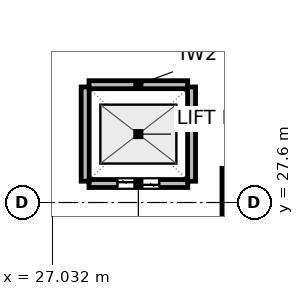
"""IFC4 building model, lengths in metres.
Left out: names, types, materials, properties, quantities, classifications, styles, units other than length and angle.
Written with IfcOpenShell. Run it as: python <this file> out.ifc"""

import sys

from ifc_helpers import new_model, si_unit, direction, frame, frame_2d, origin, origin_2d, place, context, subcontext, project, spatial, rectangle, extrude, element, fill, save


model = new_model("IFC4")
c1 = context("Model", 3, precision=1e-05, world=origin(), true_north=direction((0.0, 1.0)))
c2 = subcontext(c1, "Body", "Model", "MODEL_VIEW")
j1 = project(units=[si_unit("LENGTHUNIT", "METRE"), si_unit("PLANEANGLEUNIT", "RADIAN")], contexts=[c1])
p1 = place(None, origin())
s1 = spatial("IfcSite", under=j1, at=p1, CompositionType="ELEMENT")
p2 = place(p1, origin())
s2 = spatial("IfcBuilding", under=s1, at=p2, CompositionType="ELEMENT")
p3 = place(p2, frame((0.0, 0.0, -4.5)))
s3 = spatial("IfcBuildingStorey", under=s2, at=p3, CompositionType="ELEMENT", Elevation=-4.5)
p4 = place(p3, frame((32.4, 27.6, 0.0), z_axis=(0.0, 0.0, 1.0), x_axis=(1.0, 0.0, 0.0)))
e1 = element("IfcColumn", 1, at=p4, inside=s3, PredefinedType="COLUMN", context=c2, shape_type="SweptSolid", body=[
    extrude(rectangle(XDim=1.8, YDim=1.8, at=origin_2d()), origin(), (0.0, 0.0, 1.0), 4.5),
])
p5 = place(p3, frame((28.0, 28.1, 0.0), z_axis=(0.0, 0.0, 1.0), x_axis=(1.0, 0.0, 0.0)))
e2 = element("IfcWall", 2, at=p5, inside=s3, PredefinedType="PARTITIONING", context=c2, shape_type="SweptSolid", body=[
    extrude(rectangle(XDim=2.6, YDim=0.21, at=frame_2d((1.3, 0.0))), origin(), (0.0, 0.0, 1.0), 4.18),
])
p6 = place(p5, frame((0.75, 0.0, 0.0)))
e3 = element("IfcOpeningElement", 3, at=p6, cuts=e2, PredefinedType="OPENING", context=c2, shape_type="SweptSolid", body=[
    extrude(rectangle(XDim=1.1, YDim=2.04, at=frame_2d((0.55, 1.02))), frame((0.0, 0.115, 0.0), z_axis=(0.0, -1.0, 0.0), x_axis=(1.0, 0.0, 0.0)), (0.0, 0.0, 1.0), 0.23),
])
p7 = place(p3, frame((28.0, 30.7, 0.0), z_axis=(0.0, 0.0, 1.0), x_axis=(1.0, 0.0, 0.0)))
e4 = element("IfcWall", 4, at=p7, inside=s3, PredefinedType="PARTITIONING", context=c2, shape_type="SweptSolid", body=[
    extrude(rectangle(XDim=2.6, YDim=0.21, at=frame_2d((1.3, 0.0))), origin(), (0.0, 0.0, 1.0), 4.18),
])
for number, where, z_axis, x_axis in (
    (5, (27.9, 28.16, 0.0), (0.0, 0.0, 1.0), (0.0, 1.0, 0.0)),
    (6, (30.7, 28.16, 0.0), (0.0, 0.0, 1.0), (0.0, 1.0, 0.0)),
):
    element("IfcWall", number, at=place(p3, frame(where, z_axis=z_axis, x_axis=x_axis)), inside=s3, PredefinedType="PARTITIONING", context=c2, shape_type="SweptSolid", body=[
        extrude(rectangle(XDim=2.48, YDim=0.21, at=frame_2d((1.24, 0.0))), origin(), (0.0, 0.0, 1.0), 4.18),
    ])
p8 = place(p6, origin())
e7 = element("IfcDoor", 7, at=p8, inside=s3, OperationType="DOUBLE_DOOR_SLIDING", PredefinedType="DOOR", context=c2, shape_type="SweptSolid", body=[
    extrude(rectangle(XDim=1.1, YDim=2.04, at=frame_2d((0.55, 1.02))), frame((0.0, 0.025, 0.0), z_axis=(0.0, -1.0, 0.0), x_axis=(1.0, 0.0, 0.0)), (0.0, 0.0, 1.0), 0.05),
])
fill(e3, e7)
save(model, sys.argv[1])
